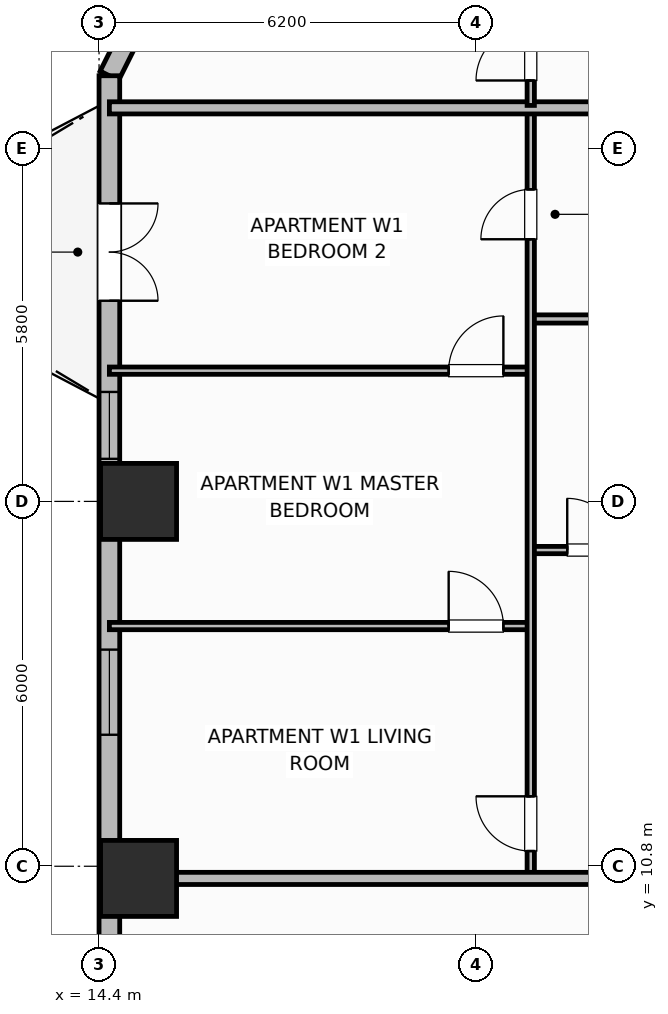
"""IFC4 building model, lengths in metres.
Left out: names, types, materials, properties, quantities, classifications, styles, units other than length and angle.
Written with IfcOpenShell. Run it as: python <this file> out.ifc"""

import sys

from ifc_helpers import new_model, si_unit, direction, frame, frame_2d, origin, origin_2d, place, context, subcontext, project, spatial, rectangle, extrude, element, fill, save


model = new_model("IFC4")
c1 = context("Model", 3, precision=1e-05, world=origin(), true_north=direction((0.0, 1.0)))
c2 = subcontext(c1, "Body", "Model", "MODEL_VIEW")
j1 = project(units=[si_unit("LENGTHUNIT", "METRE"), si_unit("PLANEANGLEUNIT", "RADIAN")], contexts=[c1])
p1 = place(None, origin())
s1 = spatial("IfcSite", under=j1, at=p1, CompositionType="ELEMENT")
p2 = place(p1, origin())
s2 = spatial("IfcBuilding", under=s1, at=p2, CompositionType="ELEMENT")
p3 = place(p2, frame((0.0, 0.0, 69.5)))
s3 = spatial("IfcBuildingStorey", under=s2, at=p3, CompositionType="ELEMENT", Elevation=69.5)
for number, where, z_axis, x_axis in (
    (1, (15.05, 10.6, 0.0), (0.0, 0.0, 1.0), (1.0, 0.0, 0.0)),
    (2, (15.05, 16.8, 0.0), (0.0, 0.0, 1.0), (1.0, 0.0, 0.0)),
):
    element("IfcColumn", number, at=place(p3, frame(where, z_axis=z_axis, x_axis=x_axis)), inside=s3, PredefinedType="COLUMN", context=c2, shape_type="SweptSolid", body=[
        extrude(rectangle(XDim=1.25, YDim=1.25, at=origin_2d()), origin(), (0.0, 0.0, 1.0), 3.7),
    ])
p4 = place(p3, frame((15.67, 26.0, 0.0), z_axis=(0.0, 0.0, 1.0), x_axis=(-0.447173890385, -0.894447042456, 0.0)))
e3 = element("IfcWall", 3, at=p4, inside=s3, PredefinedType="SOLIDWALL", context=c2, shape_type="SweptSolid", body=[
    extrude(rectangle(XDim=2.459, YDim=0.34, at=frame_2d((1.23, 0.0))), origin(), (0.0, 0.0, 1.0), 2.7),
])
p5 = place(p4, frame((0.68, 0.0, 0.89)))
e4 = element("IfcOpeningElement", 4, at=p5, cuts=e3, PredefinedType="OPENING", context=c2, shape_type="SweptSolid", body=[
    extrude(rectangle(XDim=1.1, YDim=1.65, at=frame_2d((0.55, 0.825))), frame((0.0, 0.18, 0.0), z_axis=(0.0, -1.0, 0.0), x_axis=(1.0, 0.0, 0.0)), (0.0, 0.0, 1.0), 0.36),
])
p6 = place(p3, frame((14.57, 23.8, 0.0), z_axis=(0.0, 0.0, 1.0), x_axis=(0.0, -1.0, 0.0)))
e5 = element("IfcWall", 5, at=p6, inside=s3, PredefinedType="SOLIDWALL", context=c2, shape_type="SweptSolid", body=[
    extrude(rectangle(XDim=14.8, YDim=0.34, at=frame_2d((7.4, 0.0))), origin(), (0.0, 0.0, 1.0), 2.7),
])
p7 = place(p6, frame((2.1, 0.0, 0.0)))
e6 = element("IfcOpeningElement", 6, at=p7, cuts=e5, PredefinedType="OPENING", context=c2, shape_type="SweptSolid", body=[
    extrude(rectangle(XDim=1.6, YDim=2.1, at=frame_2d((0.8, 1.05))), frame((0.0, 0.18, 0.0), z_axis=(0.0, -1.0, 0.0), x_axis=(1.0, 0.0, 0.0)), (0.0, 0.0, 1.0), 0.36),
])
p8 = place(p6, frame((5.2, 0.0, 0.89)))
e7 = element("IfcOpeningElement", 7, at=p8, cuts=e5, PredefinedType="OPENING", context=c2, shape_type="SweptSolid", body=[
    extrude(rectangle(XDim=1.1, YDim=1.65, at=frame_2d((0.55, 0.825))), frame((0.0, 0.18, 0.0), z_axis=(0.0, -1.0, 0.0), x_axis=(1.0, 0.0, 0.0)), (0.0, 0.0, 1.0), 0.36),
])
p9 = place(p6, frame((9.438, 0.0, 0.73)))
e8 = element("IfcOpeningElement", 8, at=p9, cuts=e5, PredefinedType="OPENING", context=c2, shape_type="SweptSolid", body=[
    extrude(rectangle(XDim=1.4, YDim=1.85, at=frame_2d((0.7, 0.925))), frame((0.0, 0.18, 0.0), z_axis=(0.0, -1.0, 0.0), x_axis=(1.0, 0.0, 0.0)), (0.0, 0.0, 1.0), 0.36),
])
p10 = place(p3, frame((21.5, 16.0, 0.0), z_axis=(0.0, 0.0, 1.0), x_axis=(1.0, 0.0, 0.0)))
e9 = element("IfcWall", 9, at=p10, inside=s3, PredefinedType="PARTITIONING", context=c2, shape_type="SweptSolid", body=[
    extrude(rectangle(XDim=2.25, YDim=0.12, at=frame_2d((1.125, 0.0))), origin(), (0.0, 0.0, 1.0), 2.53),
])
p11 = place(p10, frame((0.6, 0.0, 0.0)))
e10 = element("IfcOpeningElement", 10, at=p11, cuts=e9, PredefinedType="OPENING", context=c2, shape_type="SweptSolid", body=[
    extrude(rectangle(XDim=0.85, YDim=2.1, at=frame_2d((0.425, 1.05))), frame((0.0, 0.07, 0.0), z_axis=(0.0, -1.0, 0.0), x_axis=(1.0, 0.0, 0.0)), (0.0, 0.0, 1.0), 0.14),
])
p12 = place(p3, frame((21.5, 19.8, 0.0), z_axis=(0.0, 0.0, 1.0), x_axis=(1.0, 0.0, 0.0)))
e11 = element("IfcWall", 11, at=p12, inside=s3, PredefinedType="PARTITIONING", context=c2, shape_type="SweptSolid", body=[
    extrude(rectangle(XDim=2.25, YDim=0.135, at=frame_2d((1.125, 0.0))), origin(), (0.0, 0.0, 1.0), 2.53),
])
p13 = place(p3, frame((14.57, 14.75, 0.0), z_axis=(0.0, 0.0, 1.0), x_axis=(1.0, 0.0, 0.0)))
e12 = element("IfcWall", 12, at=p13, inside=s3, PredefinedType="PARTITIONING", context=c2, shape_type="SweptSolid", body=[
    extrude(rectangle(XDim=6.93, YDim=0.12, at=frame_2d((3.465, 0.0))), origin(), (0.0, 0.0, 1.0), 2.53),
])
p14 = place(p13, frame((5.58, 0.0, 0.0)))
e13 = element("IfcOpeningElement", 13, at=p14, cuts=e12, PredefinedType="OPENING", context=c2, shape_type="SweptSolid", body=[
    extrude(rectangle(XDim=0.9, YDim=2.1, at=frame_2d((0.45, 1.05))), frame((0.0, 0.07, 0.0), z_axis=(0.0, -1.0, 0.0), x_axis=(1.0, 0.0, 0.0)), (0.0, 0.0, 1.0), 0.14),
])
p15 = place(p3, frame((14.57, 18.95, 0.0), z_axis=(0.0, 0.0, 1.0), x_axis=(1.0, 0.0, 0.0)))
e14 = element("IfcWall", 14, at=p15, inside=s3, PredefinedType="PARTITIONING", context=c2, shape_type="SweptSolid", body=[
    extrude(rectangle(XDim=6.93, YDim=0.12, at=frame_2d((3.465, 0.0))), origin(), (0.0, 0.0, 1.0), 2.53),
])
p16 = place(p15, frame((5.58, 0.0, 0.0)))
e15 = element("IfcOpeningElement", 15, at=p16, cuts=e14, PredefinedType="OPENING", context=c2, shape_type="SweptSolid", body=[
    extrude(rectangle(XDim=0.9, YDim=2.1, at=frame_2d((0.45, 1.05))), frame((0.0, 0.07, 0.0), z_axis=(0.0, -1.0, 0.0), x_axis=(1.0, 0.0, 0.0)), (0.0, 0.0, 1.0), 0.14),
])
p17 = place(p3, frame((21.5, 10.64, 0.0), z_axis=(0.0, 0.0, 1.0), x_axis=(0.0, 1.0, 0.0)))
e16 = element("IfcWall", 16, at=p17, inside=s3, PredefinedType="PARTITIONING", context=c2, shape_type="SweptSolid", body=[
    extrude(rectangle(XDim=12.592, YDim=0.12, at=frame_2d((6.296, 0.0))), origin(), (0.0, 0.0, 1.0), 2.53),
])
p18 = place(p17, frame((0.41, 0.0, 0.0)))
e17 = element("IfcOpeningElement", 17, at=p18, cuts=e16, PredefinedType="OPENING", context=c2, shape_type="SweptSolid", body=[
    extrude(rectangle(XDim=0.9, YDim=2.1, at=frame_2d((0.45, 1.05))), frame((0.0, 0.07, 0.0), z_axis=(0.0, -1.0, 0.0), x_axis=(1.0, 0.0, 0.0)), (0.0, 0.0, 1.0), 0.14),
])
p19 = place(p17, frame((10.471, 0.0, 0.0)))
e18 = element("IfcOpeningElement", 18, at=p19, cuts=e16, PredefinedType="OPENING", context=c2, shape_type="SweptSolid", body=[
    extrude(rectangle(XDim=0.82, YDim=2.08, at=frame_2d((0.41, 1.04))), frame((0.0, 0.07, 0.0), z_axis=(0.0, -1.0, 0.0), x_axis=(1.0, 0.0, 0.0)), (0.0, 0.0, 1.0), 0.14),
])
p20 = place(p3, frame((14.57, 23.272, 0.0), z_axis=(0.0, 0.0, 1.0), x_axis=(1.0, 0.0, 0.0)))
e19 = element("IfcWall", 19, at=p20, inside=s3, PredefinedType="PARTITIONING", context=c2, shape_type="SweptSolid", body=[
    extrude(rectangle(XDim=9.18, YDim=0.2, at=frame_2d((4.59, 0.0))), origin(), (0.0, 0.0, 1.0), 2.53),
])
p21 = place(p3, frame((21.5, 23.312, 0.0), z_axis=(0.0, 0.0, 1.0), x_axis=(0.0, 1.0, 0.0)))
e20 = element("IfcWall", 20, at=p21, inside=s3, PredefinedType="PARTITIONING", context=c2, shape_type="SweptSolid", body=[
    extrude(rectangle(XDim=11.888, YDim=0.12, at=frame_2d((5.944, 0.0))), origin(), (0.0, 0.0, 1.0), 2.53),
])
p22 = place(p21, frame((0.41, 0.0, 0.0)))
e21 = element("IfcOpeningElement", 21, at=p22, cuts=e20, PredefinedType="OPENING", context=c2, shape_type="SweptSolid", body=[
    extrude(rectangle(XDim=0.9, YDim=2.1, at=frame_2d((0.45, 1.05))), frame((0.0, 0.07, 0.0), z_axis=(0.0, -1.0, 0.0), x_axis=(1.0, 0.0, 0.0)), (0.0, 0.0, 1.0), 0.14),
])
p23 = place(p21, frame((10.119, 0.0, 0.0)))
e22 = element("IfcOpeningElement", 22, at=p23, cuts=e20, PredefinedType="OPENING", context=c2, shape_type="SweptSolid", body=[
    extrude(rectangle(XDim=0.82, YDim=2.08, at=frame_2d((0.41, 1.04))), frame((0.0, 0.07, 0.0), z_axis=(0.0, -1.0, 0.0), x_axis=(1.0, 0.0, 0.0)), (0.0, 0.0, 1.0), 0.14),
])
p24 = place(p3, frame((14.99, 10.6, 0.0), z_axis=(0.0, 0.0, 1.0), x_axis=(1.0, 0.0, 0.0)))
e23 = element("IfcWall", 23, at=p24, inside=s3, PredefinedType="PARTITIONING", context=c2, shape_type="SweptSolid", body=[
    extrude(rectangle(XDim=8.76, YDim=0.2, at=frame_2d((4.38, 0.0))), origin(), (0.0, 0.0, 1.0), 2.53),
])
p25 = place(p7, origin())
e24 = element("IfcDoor", 24, at=p25, inside=s3, OperationType="DOUBLE_DOOR_SINGLE_SWING", PredefinedType="DOOR", context=c2, shape_type="SweptSolid", body=[
    extrude(rectangle(XDim=1.6, YDim=2.1, at=frame_2d((0.8, 1.05))), frame((0.0, 0.025, 0.0), z_axis=(0.0, -1.0, 0.0), x_axis=(1.0, 0.0, 0.0)), (0.0, 0.0, 1.0), 0.05),
])
fill(e6, e24)
p26 = place(p8, origin())
e25 = element("IfcWindow", 25, at=p26, inside=s3, PartitioningType="SINGLE_PANEL", PredefinedType="WINDOW", context=c2, shape_type="SweptSolid", body=[
    extrude(rectangle(XDim=1.1, YDim=1.65, at=frame_2d((0.55, 0.825))), frame((0.0, 0.03, 0.0), z_axis=(0.0, -1.0, 0.0), x_axis=(1.0, 0.0, 0.0)), (0.0, 0.0, 1.0), 0.06),
])
fill(e7, e25)
p27 = place(p9, origin())
e26 = element("IfcWindow", 26, at=p27, inside=s3, PartitioningType="SINGLE_PANEL", PredefinedType="WINDOW", context=c2, shape_type="SweptSolid", body=[
    extrude(rectangle(XDim=1.4, YDim=1.85, at=frame_2d((0.7, 0.925))), frame((0.0, 0.03, 0.0), z_axis=(0.0, -1.0, 0.0), x_axis=(1.0, 0.0, 0.0)), (0.0, 0.0, 1.0), 0.06),
])
fill(e8, e26)
p28 = place(p11, origin())
e27 = element("IfcDoor", 27, at=p28, inside=s3, OperationType="SINGLE_SWING_LEFT", PredefinedType="DOOR", context=c2, shape_type="SweptSolid", body=[
    extrude(rectangle(XDim=0.85, YDim=2.1, at=frame_2d((0.425, 1.05))), frame((0.0, 0.025, 0.0), z_axis=(0.0, -1.0, 0.0), x_axis=(1.0, 0.0, 0.0)), (0.0, 0.0, 1.0), 0.05),
])
fill(e10, e27)
p29 = place(p14, origin())
e28 = element("IfcDoor", 28, at=p29, inside=s3, OperationType="SINGLE_SWING_LEFT", PredefinedType="DOOR", context=c2, shape_type="SweptSolid", body=[
    extrude(rectangle(XDim=0.9, YDim=2.1, at=frame_2d((0.45, 1.05))), frame((0.0, 0.025, 0.0), z_axis=(0.0, -1.0, 0.0), x_axis=(1.0, 0.0, 0.0)), (0.0, 0.0, 1.0), 0.05),
])
fill(e13, e28)
p30 = place(p16, origin())
e29 = element("IfcDoor", 29, at=p30, inside=s3, OperationType="SINGLE_SWING_RIGHT", PredefinedType="DOOR", context=c2, shape_type="SweptSolid", body=[
    extrude(rectangle(XDim=0.9, YDim=2.1, at=frame_2d((0.45, 1.05))), frame((0.0, 0.025, 0.0), z_axis=(0.0, -1.0, 0.0), x_axis=(1.0, 0.0, 0.0)), (0.0, 0.0, 1.0), 0.05),
])
fill(e15, e29)
p31 = place(p18, origin())
e30 = element("IfcDoor", 30, at=p31, inside=s3, OperationType="SINGLE_SWING_RIGHT", PredefinedType="DOOR", context=c2, shape_type="SweptSolid", body=[
    extrude(rectangle(XDim=0.9, YDim=2.1, at=frame_2d((0.45, 1.05))), frame((0.0, 0.025, 0.0), z_axis=(0.0, -1.0, 0.0), x_axis=(1.0, 0.0, 0.0)), (0.0, 0.0, 1.0), 0.05),
])
fill(e17, e30)
p32 = place(p19, origin())
e31 = element("IfcDoor", 31, at=p32, inside=s3, OperationType="SINGLE_SWING_LEFT", PredefinedType="DOOR", context=c2, shape_type="SweptSolid", body=[
    extrude(rectangle(XDim=0.82, YDim=2.08, at=frame_2d((0.41, 1.04))), frame((0.0, 0.025, 0.0), z_axis=(0.0, -1.0, 0.0), x_axis=(1.0, 0.0, 0.0)), (0.0, 0.0, 1.0), 0.05),
])
fill(e18, e31)
p33 = place(p22, origin())
e32 = element("IfcDoor", 32, at=p33, inside=s3, OperationType="SINGLE_SWING_LEFT", PredefinedType="DOOR", context=c2, shape_type="SweptSolid", body=[
    extrude(rectangle(XDim=0.9, YDim=2.1, at=frame_2d((0.45, 1.05))), frame((0.0, 0.025, 0.0), z_axis=(0.0, -1.0, 0.0), x_axis=(1.0, 0.0, 0.0)), (0.0, 0.0, 1.0), 0.05),
])
fill(e21, e32)
save(model, sys.argv[1])
